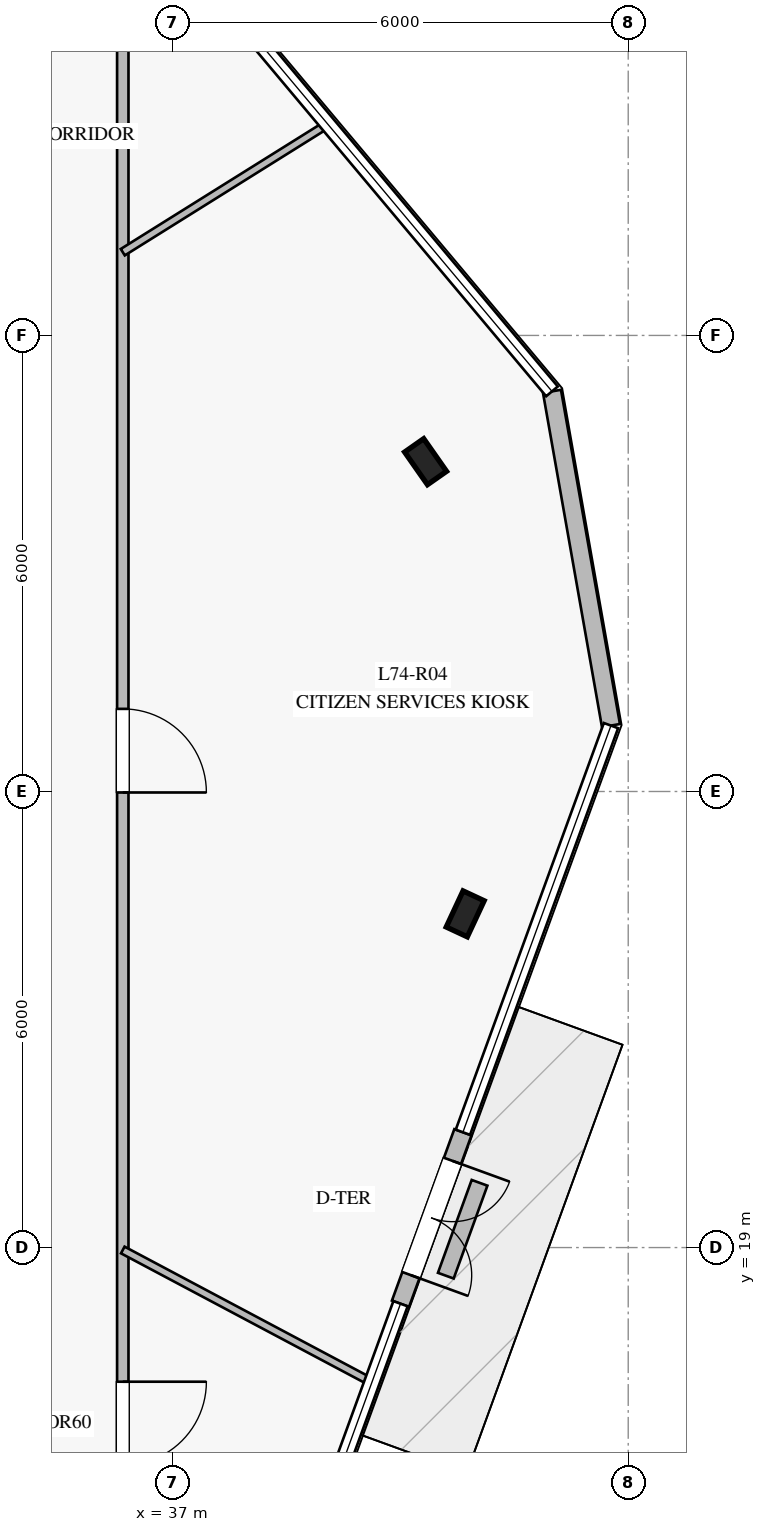
"""IFC4 building model, lengths in metres.
Left out: names, types, materials, properties, quantities, classifications, styles, units other than length and angle.
Written with IfcOpenShell. Run it as: python <this file> out.ifc"""

import sys

from ifc_helpers import new_model, si_unit, direction, frame, frame_2d, origin, origin_2d, place, context, subcontext, project, spatial, rectangle, i_section, extrude, element, fill, save


model = new_model("IFC4")
c1 = context("Model", 3, precision=1e-05, world=origin(), true_north=direction((0.0, 1.0)))
c2 = subcontext(c1, "Body", "Model", "MODEL_VIEW")
j1 = project(units=[si_unit("LENGTHUNIT", "METRE"), si_unit("PLANEANGLEUNIT", "RADIAN")], contexts=[c1])
p1 = place(None, origin())
s1 = spatial("IfcSite", under=j1, at=p1, CompositionType="ELEMENT")
p2 = place(p1, origin())
s2 = spatial("IfcBuilding", under=s1, at=p2, CompositionType="ELEMENT")
p3 = place(p2, frame((0.0, 0.0, 306.2)))
s3 = spatial("IfcBuildingStorey", under=s2, at=p3, CompositionType="ELEMENT", Elevation=306.2)
for number, where, z_axis, x_axis in (
    (1, (40.855, 23.39, 0.0), (0.0, 0.0, 1.0), (0.423, 0.906, 0.0)),
    (2, (40.334, 29.339, 0.0), (0.0, 0.0, 1.0), (-0.574, 0.819, 0.0)),
):
    element("IfcColumn", number, at=place(p3, frame(where, z_axis=z_axis, x_axis=x_axis)), inside=s3, PredefinedType="COLUMN", context=c2, shape_type="SweptSolid", body=[
        extrude(i_section(OverallWidth=0.306, OverallDepth=0.524, WebThickness=0.021, FlangeThickness=0.04, at=origin_2d()), origin(), (0.0, 0.0, 1.0), 4.0),
    ])
p4 = place(p3, frame((40.004, 18.261, 0.0), z_axis=(0.0, 0.0, 1.0), x_axis=(0.341979831546, 0.939707292095, 0.0)))
e3 = element("IfcWall", 3, at=p4, inside=s3, PredefinedType="STANDARD", context=c2, shape_type="SweptSolid", body=[
    extrude(rectangle(XDim=2.401, YDim=0.24, at=frame_2d((1.2, 0.0))), origin(), (0.0, 0.0, 1.0), 3.78),
])
p5 = place(p4, frame((0.4, 0.0, 0.0)))
e4 = element("IfcOpeningElement", 4, at=p5, cuts=e3, PredefinedType="OPENING", context=c2, shape_type="SweptSolid", body=[
    extrude(rectangle(XDim=1.6, YDim=2.25, at=frame_2d((0.8, 1.125))), frame((0.0, 0.13, 0.0), z_axis=(0.0, -1.0, 0.0), x_axis=(1.0, 0.0, 0.0)), (0.0, 0.0, 1.0), 0.26),
])
p6 = place(p3, frame((42.773, 25.867, 0.0), z_axis=(0.0, 0.0, 1.0), x_axis=(-0.173772856593, 0.984785760616, 0.0)))
e5 = element("IfcWall", 5, at=p6, inside=s3, PredefinedType="STANDARD", context=c2, shape_type="SweptSolid", body=[
    extrude(rectangle(XDim=4.465, YDim=0.24, at=frame_2d((2.232, 0.0))), origin(), (0.0, 0.0, 1.0), 3.78),
])
p7 = place(p3, frame((40.6, 18.63, 0.0), z_axis=(0.0, 0.0, 1.0), x_axis=(0.341351063346, 0.939935876298, 0.0)))
e6 = element("IfcWall", 6, at=p7, inside=s3, PredefinedType="USERDEFINED", context=c2, shape_type="SweptSolid", body=[
    extrude(rectangle(XDim=1.3, YDim=0.22, at=frame_2d((0.65, 0.0))), origin(), (0.0, 0.0, 1.0), 0.4),
])
p8 = place(p3, frame((36.35, 35.75, 0.0), z_axis=(0.0, 0.0, 1.0), x_axis=(0.0, -1.0, 0.0)))
e7 = element("IfcWall", 7, at=p8, inside=s3, PredefinedType="PARTITIONING", context=c2, shape_type="SweptSolid", body=[
    extrude(rectangle(XDim=21.5, YDim=0.15, at=frame_2d((10.75, 0.0))), origin(), (0.0, 0.0, 1.0), 3.25),
])
p9 = place(p8, frame((18.515, 0.0, 0.0)))
e8 = element("IfcOpeningElement", 8, at=p9, cuts=e7, PredefinedType="OPENING", context=c2, shape_type="SweptSolid", body=[
    extrude(rectangle(XDim=1.1, YDim=2.2, at=frame_2d((0.55, 1.1))), frame((0.0, 0.085, 0.0), z_axis=(0.0, -1.0, 0.0), x_axis=(1.0, 0.0, 0.0)), (0.0, 0.0, 1.0), 0.17),
])
p10 = place(p8, frame((9.663, 0.0, 0.0)))
e9 = element("IfcOpeningElement", 9, at=p10, cuts=e7, PredefinedType="OPENING", context=c2, shape_type="SweptSolid", body=[
    extrude(rectangle(XDim=1.1, YDim=2.2, at=frame_2d((0.55, 1.1))), frame((0.0, 0.085, 0.0), z_axis=(0.0, -1.0, 0.0), x_axis=(1.0, 0.0, 0.0)), (0.0, 0.0, 1.0), 0.17),
])
p11 = place(p3, frame((36.35, 18.968, 0.0), z_axis=(0.0, 0.0, 1.0), x_axis=(0.883037861364, -0.469301753031, 0.0)))
e10 = element("IfcWall", 10, at=p11, inside=s3, PredefinedType="MOVABLE", context=c2, shape_type="SweptSolid", body=[
    extrude(rectangle(XDim=3.695, YDim=0.1, at=frame_2d((1.848, 0.0))), origin(), (0.0, 0.0, 1.0), 3.28),
])
p12 = place(p3, frame((36.35, 32.095, 0.0), z_axis=(0.0, 0.0, 1.0), x_axis=(0.847967956765, 0.530047492494, 0.0)))
e11 = element("IfcWall", 11, at=p12, inside=s3, PredefinedType="MOVABLE", context=c2, shape_type="SweptSolid", body=[
    extrude(rectangle(XDim=3.164, YDim=0.1, at=frame_2d((1.582, 0.0))), origin(), (0.0, 0.0, 1.0), 3.28),
])
p13 = place(p5, frame((1.6, 0.0, 0.0), z_axis=(0.0, 0.0, 1.0), x_axis=(-1.0, 0.0, 0.0)))
e12 = element("IfcDoor", 12, at=p13, inside=s3, OperationType="DOUBLE_DOOR_SINGLE_SWING", PredefinedType="DOOR", context=c2, shape_type="SweptSolid", body=[
    extrude(rectangle(XDim=1.6, YDim=2.25, at=frame_2d((0.8, 1.125))), frame((0.0, 0.025, 0.0), z_axis=(0.0, -1.0, 0.0), x_axis=(1.0, 0.0, 0.0)), (0.0, 0.0, 1.0), 0.05),
])
fill(e4, e12)
p14 = place(p9, origin())
e13 = element("IfcDoor", 13, at=p14, inside=s3, OperationType="SINGLE_SWING_LEFT", PredefinedType="DOOR", context=c2, shape_type="SweptSolid", body=[
    extrude(rectangle(XDim=1.1, YDim=2.2, at=frame_2d((0.55, 1.1))), frame((0.0, 0.025, 0.0), z_axis=(0.0, -1.0, 0.0), x_axis=(1.0, 0.0, 0.0)), (0.0, 0.0, 1.0), 0.05),
])
fill(e8, e13)
p15 = place(p10, origin())
e14 = element("IfcDoor", 14, at=p15, inside=s3, OperationType="SINGLE_SWING_RIGHT", PredefinedType="DOOR", context=c2, shape_type="SweptSolid", body=[
    extrude(rectangle(XDim=1.1, YDim=2.2, at=frame_2d((0.55, 1.1))), frame((0.0, 0.025, 0.0), z_axis=(0.0, -1.0, 0.0), x_axis=(1.0, 0.0, 0.0)), (0.0, 0.0, 1.0), 0.05),
])
fill(e9, e14)
save(model, sys.argv[1])
